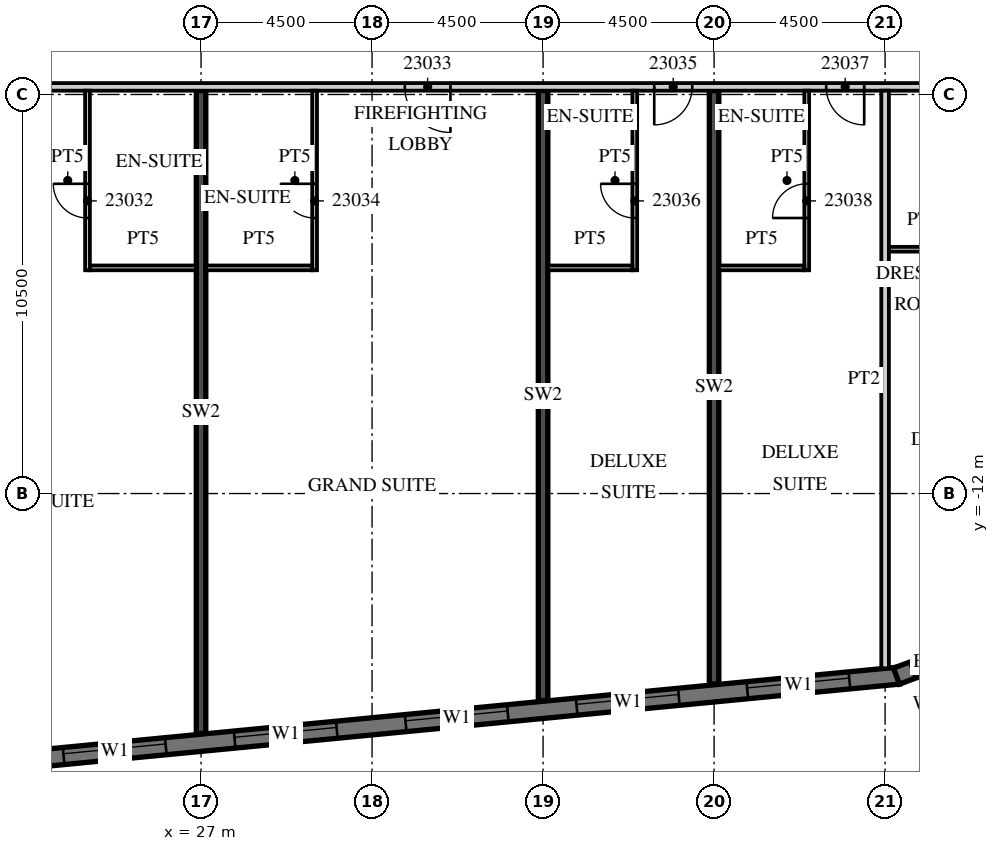
"""IFC4 building model, lengths in metres.
Left out: names, types, materials, properties, quantities, classifications, styles, units other than length and angle.
Written with IfcOpenShell. Run it as: python <this file> out.ifc"""

import sys

from ifc_helpers import new_model, si_unit, direction, frame, frame_2d, origin, place, context, subcontext, project, spatial, polyline, rectangle, outline, extrude, element, fill, save


model = new_model("IFC4")
c1 = context("Model", 3, precision=1e-05, world=origin(), true_north=direction((0.0, 1.0)))
c2 = subcontext(c1, "Body", "Model", "MODEL_VIEW")
j1 = project(units=[si_unit("LENGTHUNIT", "METRE"), si_unit("PLANEANGLEUNIT", "RADIAN")], contexts=[c1])
p1 = place(None, origin())
s1 = spatial("IfcSite", under=j1, at=p1, CompositionType="ELEMENT")
p2 = place(p1, origin())
s2 = spatial("IfcBuilding", under=s1, at=p2, CompositionType="ELEMENT")
p3 = place(p2, frame((0.0, 0.0, 110.8)))
s3 = spatial("IfcBuildingStorey", under=s2, at=p3, CompositionType="ELEMENT", Elevation=110.8)
p4 = place(p3, frame((27.0, -18.311, 0.0), z_axis=(0.0, 0.0, 1.0), x_axis=(0.0, 1.0, 0.0)))
e1 = element("IfcWall", 1, at=p4, inside=s3, PredefinedType="SHEAR", context=c2, shape_type="SweptSolid", body=[
    extrude(rectangle(XDim=16.911, YDim=0.25, at=frame_2d((8.455, 0.0))), origin(), (0.0, 0.0, 1.0), 3.3),
])
p5 = place(p3, frame((36.0, -17.444, 0.0), z_axis=(0.0, 0.0, 1.0), x_axis=(0.0, 1.0, 0.0)))
e2 = element("IfcWall", 2, at=p5, inside=s3, PredefinedType="SHEAR", context=c2, shape_type="SweptSolid", body=[
    extrude(rectangle(XDim=16.044, YDim=0.25, at=frame_2d((8.022, 0.0))), origin(), (0.0, 0.0, 1.0), 3.3),
])
p6 = place(p3, frame((40.5, -17.011, 0.0), z_axis=(0.0, 0.0, 1.0), x_axis=(0.0, 1.0, 0.0)))
e3 = element("IfcWall", 3, at=p6, inside=s3, PredefinedType="SHEAR", context=c2, shape_type="SweptSolid", body=[
    extrude(rectangle(XDim=15.611, YDim=0.25, at=frame_2d((7.805, 0.0))), origin(), (0.0, 0.0, 1.0), 3.3),
])
p7 = place(p3, frame((-13.521, -22.46, 0.0), z_axis=(0.0, 0.0, 1.0), x_axis=(0.995396096335, 0.095846812164, 0.0)))
e4 = element("IfcWall", 4, at=p7, inside=s3, PredefinedType="SOLIDWALL", context=c2, shape_type="SweptSolid", body=[
    extrude(rectangle(XDim=59.151, YDim=0.45, at=frame_2d((29.575, 0.0))), origin(), (0.0, 0.0, 1.0), 3.02),
])
p8 = place(p7, frame((0.91, 0.0, 0.45)))
e5 = element("IfcOpeningElement", 5, at=p8, cuts=e4, PredefinedType="OPENING", context=c2, shape_type="SweptSolid", body=[
    extrude(rectangle(XDim=2.7, YDim=2.25, at=frame_2d((1.35, 1.125))), frame((0.0, 0.235, 0.0), z_axis=(0.0, -1.0, 0.0), x_axis=(1.0, 0.0, 0.0)), (0.0, 0.0, 1.0), 0.47),
])
p9 = place(p7, frame((5.431, 0.0, 0.45)))
e6 = element("IfcOpeningElement", 6, at=p9, cuts=e4, PredefinedType="OPENING", context=c2, shape_type="SweptSolid", body=[
    extrude(rectangle(XDim=2.7, YDim=2.25, at=frame_2d((1.35, 1.125))), frame((0.0, 0.235, 0.0), z_axis=(0.0, -1.0, 0.0), x_axis=(1.0, 0.0, 0.0)), (0.0, 0.0, 1.0), 0.47),
])
p10 = place(p7, frame((9.952, 0.0, 0.45)))
e7 = element("IfcOpeningElement", 7, at=p10, cuts=e4, PredefinedType="OPENING", context=c2, shape_type="SweptSolid", body=[
    extrude(rectangle(XDim=2.7, YDim=2.25, at=frame_2d((1.35, 1.125))), frame((0.0, 0.235, 0.0), z_axis=(0.0, -1.0, 0.0), x_axis=(1.0, 0.0, 0.0)), (0.0, 0.0, 1.0), 0.47),
])
p11 = place(p7, frame((14.473, 0.0, 0.45)))
e8 = element("IfcOpeningElement", 8, at=p11, cuts=e4, PredefinedType="OPENING", context=c2, shape_type="SweptSolid", body=[
    extrude(rectangle(XDim=2.7, YDim=2.25, at=frame_2d((1.35, 1.125))), frame((0.0, 0.235, 0.0), z_axis=(0.0, -1.0, 0.0), x_axis=(1.0, 0.0, 0.0)), (0.0, 0.0, 1.0), 0.47),
])
p12 = place(p7, frame((18.994, 0.0, 0.45)))
e9 = element("IfcOpeningElement", 9, at=p12, cuts=e4, PredefinedType="OPENING", context=c2, shape_type="SweptSolid", body=[
    extrude(rectangle(XDim=2.7, YDim=2.25, at=frame_2d((1.35, 1.125))), frame((0.0, 0.235, 0.0), z_axis=(0.0, -1.0, 0.0), x_axis=(1.0, 0.0, 0.0)), (0.0, 0.0, 1.0), 0.47),
])
p13 = place(p7, frame((23.514, 0.0, 0.45)))
e10 = element("IfcOpeningElement", 10, at=p13, cuts=e4, PredefinedType="OPENING", context=c2, shape_type="SweptSolid", body=[
    extrude(rectangle(XDim=2.7, YDim=2.25, at=frame_2d((1.35, 1.125))), frame((0.0, 0.235, 0.0), z_axis=(0.0, -1.0, 0.0), x_axis=(1.0, 0.0, 0.0)), (0.0, 0.0, 1.0), 0.47),
])
p14 = place(p7, frame((28.035, 0.0, 0.45)))
e11 = element("IfcOpeningElement", 11, at=p14, cuts=e4, PredefinedType="OPENING", context=c2, shape_type="SweptSolid", body=[
    extrude(rectangle(XDim=2.7, YDim=2.25, at=frame_2d((1.35, 1.125))), frame((0.0, 0.235, 0.0), z_axis=(0.0, -1.0, 0.0), x_axis=(1.0, 0.0, 0.0)), (0.0, 0.0, 1.0), 0.47),
])
p15 = place(p7, frame((32.556, 0.0, 0.45)))
e12 = element("IfcOpeningElement", 12, at=p15, cuts=e4, PredefinedType="OPENING", context=c2, shape_type="SweptSolid", body=[
    extrude(rectangle(XDim=2.7, YDim=2.25, at=frame_2d((1.35, 1.125))), frame((0.0, 0.235, 0.0), z_axis=(0.0, -1.0, 0.0), x_axis=(1.0, 0.0, 0.0)), (0.0, 0.0, 1.0), 0.47),
])
p16 = place(p7, frame((37.077, 0.0, 0.45)))
e13 = element("IfcOpeningElement", 13, at=p16, cuts=e4, PredefinedType="OPENING", context=c2, shape_type="SweptSolid", body=[
    extrude(rectangle(XDim=2.7, YDim=2.25, at=frame_2d((1.35, 1.125))), frame((0.0, 0.235, 0.0), z_axis=(0.0, -1.0, 0.0), x_axis=(1.0, 0.0, 0.0)), (0.0, 0.0, 1.0), 0.47),
])
p17 = place(p7, frame((41.598, 0.0, 0.45)))
e14 = element("IfcOpeningElement", 14, at=p17, cuts=e4, PredefinedType="OPENING", context=c2, shape_type="SweptSolid", body=[
    extrude(rectangle(XDim=2.7, YDim=2.25, at=frame_2d((1.35, 1.125))), frame((0.0, 0.235, 0.0), z_axis=(0.0, -1.0, 0.0), x_axis=(1.0, 0.0, 0.0)), (0.0, 0.0, 1.0), 0.47),
])
p18 = place(p7, frame((46.118, 0.0, 0.45)))
e15 = element("IfcOpeningElement", 15, at=p18, cuts=e4, PredefinedType="OPENING", context=c2, shape_type="SweptSolid", body=[
    extrude(rectangle(XDim=2.7, YDim=2.25, at=frame_2d((1.35, 1.125))), frame((0.0, 0.235, 0.0), z_axis=(0.0, -1.0, 0.0), x_axis=(1.0, 0.0, 0.0)), (0.0, 0.0, 1.0), 0.47),
])
p19 = place(p7, frame((50.639, 0.0, 0.45)))
e16 = element("IfcOpeningElement", 16, at=p19, cuts=e4, PredefinedType="OPENING", context=c2, shape_type="SweptSolid", body=[
    extrude(rectangle(XDim=2.7, YDim=2.25, at=frame_2d((1.35, 1.125))), frame((0.0, 0.235, 0.0), z_axis=(0.0, -1.0, 0.0), x_axis=(1.0, 0.0, 0.0)), (0.0, 0.0, 1.0), 0.47),
])
p20 = place(p7, frame((55.15, 0.0, 0.45)))
e17 = element("IfcOpeningElement", 17, at=p20, cuts=e4, PredefinedType="OPENING", context=c2, shape_type="SweptSolid", body=[
    extrude(rectangle(XDim=2.7, YDim=2.25, at=frame_2d((1.35, 1.125))), frame((0.0, 0.235, 0.0), z_axis=(0.0, -1.0, 0.0), x_axis=(1.0, 0.0, 0.0)), (0.0, 0.0, 1.0), 0.47),
])
p21 = place(p3, frame((45.3, -16.804, 0.0), z_axis=(0.0, 0.0, 1.0), x_axis=(0.936677599948, 0.350192909346, 0.0)))
e18 = element("IfcWall", 18, at=p21, inside=s3, PredefinedType="SOLIDWALL", context=c2, shape_type="SweptSolid", body=[
    extrude(outline(polyline([(0.0, -0.225), (2.071, -0.225), (1.95, 0.225), (0.121, 0.225), (0.0, -0.225)])), origin(), (0.0, 0.0, 1.0), 3.02),
])
p22 = place(p21, frame((0.435, 0.0, 0.45)))
e19 = element("IfcOpeningElement", 19, at=p22, cuts=e18, PredefinedType="OPENING", context=c2, shape_type="SweptSolid", body=[
    extrude(rectangle(XDim=1.2, YDim=2.25, at=frame_2d((0.6, 1.125))), frame((0.0, 0.235, 0.0), z_axis=(0.0, -1.0, 0.0), x_axis=(1.0, 0.0, 0.0)), (0.0, 0.0, 1.0), 0.47),
])
p23 = place(p3, frame((48.753, -12.672, 0.0), z_axis=(0.0, 0.0, 1.0), x_axis=(-0.095842661909, 0.995396495954, 0.0)))
e20 = element("IfcWall", 20, at=p23, inside=s3, PredefinedType="SOLIDWALL", context=c2, shape_type="SweptSolid", body=[
    extrude(rectangle(XDim=35.0, YDim=0.45, at=frame_2d((17.5, 0.0))), origin(), (0.0, 0.0, 1.0), 3.02),
])
p24 = place(p23, frame((3.072, 0.0, 0.45)))
e21 = element("IfcOpeningElement", 21, at=p24, cuts=e20, PredefinedType="OPENING", context=c2, shape_type="SweptSolid", body=[
    extrude(rectangle(XDim=3.3, YDim=2.25, at=frame_2d((1.65, 1.125))), frame((0.0, 0.235, 0.0), z_axis=(0.0, -1.0, 0.0), x_axis=(1.0, 0.0, 0.0)), (0.0, 0.0, 1.0), 0.47),
])
p25 = place(p23, frame((7.593, 0.0, 0.45)))
e22 = element("IfcOpeningElement", 22, at=p25, cuts=e20, PredefinedType="OPENING", context=c2, shape_type="SweptSolid", body=[
    extrude(rectangle(XDim=3.3, YDim=2.25, at=frame_2d((1.65, 1.125))), frame((0.0, 0.235, 0.0), z_axis=(0.0, -1.0, 0.0), x_axis=(1.0, 0.0, 0.0)), (0.0, 0.0, 1.0), 0.47),
])
p26 = place(p3, frame((-13.5, -1.3, 0.0), z_axis=(0.0, 0.0, 1.0), x_axis=(1.0, 0.0, 0.0)))
e23 = element("IfcWall", 23, at=p26, inside=s3, PredefinedType="PARTITIONING", context=c2, shape_type="SweptSolid", body=[
    extrude(rectangle(XDim=60.932, YDim=0.2, at=frame_2d((30.466, 0.0))), origin(), (0.0, 0.0, 1.0), 3.02),
])
p27 = place(p26, frame((0.575, 0.0, 0.0)))
e24 = element("IfcOpeningElement", 24, at=p27, cuts=e23, PredefinedType="OPENING", context=c2, shape_type="SweptSolid", body=[
    extrude(rectangle(XDim=1.0, YDim=2.1, at=frame_2d((0.5, 1.05))), frame((0.0, 0.11, 0.0), z_axis=(0.0, -1.0, 0.0), x_axis=(1.0, 0.0, 0.0)), (0.0, 0.0, 1.0), 0.22),
])
p28 = place(p26, frame((5.075, 0.0, 0.0)))
e25 = element("IfcOpeningElement", 25, at=p28, cuts=e23, PredefinedType="OPENING", context=c2, shape_type="SweptSolid", body=[
    extrude(rectangle(XDim=1.0, YDim=2.1, at=frame_2d((0.5, 1.05))), frame((0.0, 0.11, 0.0), z_axis=(0.0, -1.0, 0.0), x_axis=(1.0, 0.0, 0.0)), (0.0, 0.0, 1.0), 0.22),
])
p29 = place(p26, frame((11.925, 0.0, 0.0)))
e26 = element("IfcOpeningElement", 26, at=p29, cuts=e23, PredefinedType="OPENING", context=c2, shape_type="SweptSolid", body=[
    extrude(rectangle(XDim=1.0, YDim=2.1, at=frame_2d((0.5, 1.05))), frame((0.0, 0.11, 0.0), z_axis=(0.0, -1.0, 0.0), x_axis=(1.0, 0.0, 0.0)), (0.0, 0.0, 1.0), 0.22),
])
p30 = place(p26, frame((15.938, 0.0, 0.0)))
e27 = element("IfcOpeningElement", 27, at=p30, cuts=e23, PredefinedType="OPENING", context=c2, shape_type="SweptSolid", body=[
    extrude(rectangle(XDim=1.2, YDim=2.1, at=frame_2d((0.6, 1.05))), frame((0.0, 0.11, 0.0), z_axis=(0.0, -1.0, 0.0), x_axis=(1.0, 0.0, 0.0)), (0.0, 0.0, 1.0), 0.22),
])
p31 = place(p26, frame((25.45, 0.0, 0.0)))
e28 = element("IfcOpeningElement", 28, at=p31, cuts=e23, PredefinedType="OPENING", context=c2, shape_type="SweptSolid", body=[
    extrude(rectangle(XDim=1.0, YDim=2.1, at=frame_2d((0.5, 1.05))), frame((0.0, 0.11, 0.0), z_axis=(0.0, -1.0, 0.0), x_axis=(1.0, 0.0, 0.0)), (0.0, 0.0, 1.0), 0.22),
])
p32 = place(p26, frame((27.55, 0.0, 0.0)))
e29 = element("IfcOpeningElement", 29, at=p32, cuts=e23, PredefinedType="OPENING", context=c2, shape_type="SweptSolid", body=[
    extrude(rectangle(XDim=1.0, YDim=2.1, at=frame_2d((0.5, 1.05))), frame((0.0, 0.11, 0.0), z_axis=(0.0, -1.0, 0.0), x_axis=(1.0, 0.0, 0.0)), (0.0, 0.0, 1.0), 0.22),
])
p33 = place(p26, frame((33.938, 0.0, 0.0)))
e30 = element("IfcOpeningElement", 30, at=p33, cuts=e23, PredefinedType="OPENING", context=c2, shape_type="SweptSolid", body=[
    extrude(rectangle(XDim=1.2, YDim=2.1, at=frame_2d((0.6, 1.05))), frame((0.0, 0.11, 0.0), z_axis=(0.0, -1.0, 0.0), x_axis=(1.0, 0.0, 0.0)), (0.0, 0.0, 1.0), 0.22),
])
p34 = place(p26, frame((45.862, 0.0, 0.0)))
e31 = element("IfcOpeningElement", 31, at=p34, cuts=e23, PredefinedType="OPENING", context=c2, shape_type="SweptSolid", body=[
    extrude(rectangle(XDim=1.2, YDim=2.1, at=frame_2d((0.6, 1.05))), frame((0.0, 0.11, 0.0), z_axis=(0.0, -1.0, 0.0), x_axis=(1.0, 0.0, 0.0)), (0.0, 0.0, 1.0), 0.22),
])
p35 = place(p26, frame((52.425, 0.0, 0.0)))
e32 = element("IfcOpeningElement", 32, at=p35, cuts=e23, PredefinedType="OPENING", context=c2, shape_type="SweptSolid", body=[
    extrude(rectangle(XDim=1.0, YDim=2.1, at=frame_2d((0.5, 1.05))), frame((0.0, 0.11, 0.0), z_axis=(0.0, -1.0, 0.0), x_axis=(1.0, 0.0, 0.0)), (0.0, 0.0, 1.0), 0.22),
])
p36 = place(p26, frame((56.95, 0.0, 0.0)))
e33 = element("IfcOpeningElement", 33, at=p36, cuts=e23, PredefinedType="OPENING", context=c2, shape_type="SweptSolid", body=[
    extrude(rectangle(XDim=1.0, YDim=2.1, at=frame_2d((0.5, 1.05))), frame((0.0, 0.11, 0.0), z_axis=(0.0, -1.0, 0.0), x_axis=(1.0, 0.0, 0.0)), (0.0, 0.0, 1.0), 0.22),
])
p37 = place(p26, frame((59.882, 0.0, 0.0)))
e34 = element("IfcOpeningElement", 34, at=p37, cuts=e23, PredefinedType="OPENING", context=c2, shape_type="SweptSolid", body=[
    extrude(rectangle(XDim=0.9, YDim=2.1, at=frame_2d((0.45, 1.05))), frame((0.0, 0.11, 0.0), z_axis=(0.0, -1.0, 0.0), x_axis=(1.0, 0.0, 0.0)), (0.0, 0.0, 1.0), 0.22),
])
p38 = place(p3, frame((24.012, -6.125, 0.0), z_axis=(0.0, 0.0, 1.0), x_axis=(0.0, 1.0, 0.0)))
e35 = element("IfcWall", 35, at=p38, inside=s3, PredefinedType="PARTITIONING", context=c2, shape_type="SweptSolid", body=[
    extrude(rectangle(XDim=4.725, YDim=0.125, at=frame_2d((2.363, 0.0))), origin(), (0.0, 0.0, 1.0), 3.02),
])
p39 = place(p38, frame((1.375, 0.0, 0.0)))
e36 = element("IfcOpeningElement", 36, at=p39, cuts=e35, PredefinedType="OPENING", context=c2, shape_type="SweptSolid", body=[
    extrude(rectangle(XDim=0.9, YDim=2.1, at=frame_2d((0.45, 1.05))), frame((0.0, 0.073, 0.0), z_axis=(0.0, -1.0, 0.0), x_axis=(1.0, 0.0, 0.0)), (0.0, 0.0, 1.0), 0.145),
])
p40 = place(p3, frame((24.075, -6.062, 0.0), z_axis=(0.0, 0.0, 1.0), x_axis=(1.0, 0.0, 0.0)))
e37 = element("IfcWall", 37, at=p40, inside=s3, PredefinedType="PARTITIONING", context=c2, shape_type="SweptSolid", body=[
    extrude(rectangle(XDim=2.8, YDim=0.125, at=frame_2d((1.4, 0.0))), origin(), (0.0, 0.0, 1.0), 3.02),
])
p41 = place(p3, frame((29.988, -6.125, 0.0), z_axis=(0.0, 0.0, 1.0), x_axis=(0.0, 1.0, 0.0)))
e38 = element("IfcWall", 38, at=p41, inside=s3, PredefinedType="PARTITIONING", context=c2, shape_type="SweptSolid", body=[
    extrude(rectangle(XDim=4.725, YDim=0.125, at=frame_2d((2.363, 0.0))), origin(), (0.0, 0.0, 1.0), 3.02),
])
p42 = place(p41, frame((1.375, 0.0, 0.0)))
e39 = element("IfcOpeningElement", 39, at=p42, cuts=e38, PredefinedType="OPENING", context=c2, shape_type="SweptSolid", body=[
    extrude(rectangle(XDim=0.9, YDim=2.1, at=frame_2d((0.45, 1.05))), frame((0.0, 0.073, 0.0), z_axis=(0.0, -1.0, 0.0), x_axis=(1.0, 0.0, 0.0)), (0.0, 0.0, 1.0), 0.145),
])
p43 = place(p3, frame((27.125, -6.062, 0.0), z_axis=(0.0, 0.0, 1.0), x_axis=(1.0, 0.0, 0.0)))
e40 = element("IfcWall", 40, at=p43, inside=s3, PredefinedType="PARTITIONING", context=c2, shape_type="SweptSolid", body=[
    extrude(rectangle(XDim=2.8, YDim=0.125, at=frame_2d((1.4, 0.0))), origin(), (0.0, 0.0, 1.0), 3.02),
])
p44 = place(p3, frame((38.413, -6.125, 0.0), z_axis=(0.0, 0.0, 1.0), x_axis=(0.0, 1.0, 0.0)))
e41 = element("IfcWall", 41, at=p44, inside=s3, PredefinedType="PARTITIONING", context=c2, shape_type="SweptSolid", body=[
    extrude(rectangle(XDim=4.725, YDim=0.125, at=frame_2d((2.363, 0.0))), origin(), (0.0, 0.0, 1.0), 3.02),
])
p45 = place(p44, frame((1.375, 0.0, 0.0)))
e42 = element("IfcOpeningElement", 42, at=p45, cuts=e41, PredefinedType="OPENING", context=c2, shape_type="SweptSolid", body=[
    extrude(rectangle(XDim=0.9, YDim=2.1, at=frame_2d((0.45, 1.05))), frame((0.0, 0.073, 0.0), z_axis=(0.0, -1.0, 0.0), x_axis=(1.0, 0.0, 0.0)), (0.0, 0.0, 1.0), 0.145),
])
p46 = place(p3, frame((36.125, -6.062, 0.0), z_axis=(0.0, 0.0, 1.0), x_axis=(1.0, 0.0, 0.0)))
e43 = element("IfcWall", 43, at=p46, inside=s3, PredefinedType="PARTITIONING", context=c2, shape_type="SweptSolid", body=[
    extrude(rectangle(XDim=2.225, YDim=0.125, at=frame_2d((1.113, 0.0))), origin(), (0.0, 0.0, 1.0), 3.02),
])
p47 = place(p3, frame((45.0, -16.599, 0.0), z_axis=(0.0, 0.0, 1.0), x_axis=(0.0, 1.0, 0.0)))
e44 = element("IfcWall", 44, at=p47, inside=s3, PredefinedType="PARTITIONING", context=c2, shape_type="SweptSolid", body=[
    extrude(rectangle(XDim=15.199, YDim=0.2, at=frame_2d((7.6, 0.0))), origin(), (0.0, 0.0, 1.0), 3.02),
])
p48 = place(p3, frame((42.938, -6.125, 0.0), z_axis=(0.0, 0.0, 1.0), x_axis=(0.0, 1.0, 0.0)))
e45 = element("IfcWall", 45, at=p48, inside=s3, PredefinedType="PARTITIONING", context=c2, shape_type="SweptSolid", body=[
    extrude(rectangle(XDim=4.725, YDim=0.125, at=frame_2d((2.363, 0.0))), origin(), (0.0, 0.0, 1.0), 3.02),
])
p49 = place(p48, frame((1.375, 0.0, 0.0)))
e46 = element("IfcOpeningElement", 46, at=p49, cuts=e45, PredefinedType="OPENING", context=c2, shape_type="SweptSolid", body=[
    extrude(rectangle(XDim=0.9, YDim=2.1, at=frame_2d((0.45, 1.05))), frame((0.0, 0.073, 0.0), z_axis=(0.0, -1.0, 0.0), x_axis=(1.0, 0.0, 0.0)), (0.0, 0.0, 1.0), 0.145),
])
p50 = place(p3, frame((40.625, -6.062, 0.0), z_axis=(0.0, 0.0, 1.0), x_axis=(1.0, 0.0, 0.0)))
e47 = element("IfcWall", 47, at=p50, inside=s3, PredefinedType="PARTITIONING", context=c2, shape_type="SweptSolid", body=[
    extrude(rectangle(XDim=2.25, YDim=0.125, at=frame_2d((1.125, 0.0))), origin(), (0.0, 0.0, 1.0), 3.02),
])
p51 = place(p3, frame((45.1, -5.572, 0.0), z_axis=(0.0, 0.0, 1.0), x_axis=(1.0, 0.0, 0.0)))
e48 = element("IfcWall", 48, at=p51, inside=s3, PredefinedType="PARTITIONING", context=c2, shape_type="SweptSolid", body=[
    extrude(rectangle(XDim=1.8, YDim=0.125, at=frame_2d((0.9, 0.0))), origin(), (0.0, 0.0, 1.0), 3.02),
])
p52 = place(p16, origin())
e49 = element("IfcWindow", 49, at=p52, inside=s3, PartitioningType="SINGLE_PANEL", PredefinedType="WINDOW", context=c2, shape_type="SweptSolid", body=[
    extrude(rectangle(XDim=2.7, YDim=2.25, at=frame_2d((1.35, 1.125))), frame((0.0, 0.09, 0.0), z_axis=(0.0, -1.0, 0.0), x_axis=(1.0, 0.0, 0.0)), (0.0, 0.0, 1.0), 0.06),
])
fill(e13, e49)
p53 = place(p17, origin())
e50 = element("IfcWindow", 50, at=p53, inside=s3, PartitioningType="SINGLE_PANEL", PredefinedType="WINDOW", context=c2, shape_type="SweptSolid", body=[
    extrude(rectangle(XDim=2.7, YDim=2.25, at=frame_2d((1.35, 1.125))), frame((0.0, 0.09, 0.0), z_axis=(0.0, -1.0, 0.0), x_axis=(1.0, 0.0, 0.0)), (0.0, 0.0, 1.0), 0.06),
])
fill(e14, e50)
p54 = place(p18, origin())
e51 = element("IfcWindow", 51, at=p54, inside=s3, PartitioningType="SINGLE_PANEL", PredefinedType="WINDOW", context=c2, shape_type="SweptSolid", body=[
    extrude(rectangle(XDim=2.7, YDim=2.25, at=frame_2d((1.35, 1.125))), frame((0.0, 0.09, 0.0), z_axis=(0.0, -1.0, 0.0), x_axis=(1.0, 0.0, 0.0)), (0.0, 0.0, 1.0), 0.06),
])
fill(e15, e51)
p55 = place(p19, origin())
e52 = element("IfcWindow", 52, at=p55, inside=s3, PartitioningType="SINGLE_PANEL", PredefinedType="WINDOW", context=c2, shape_type="SweptSolid", body=[
    extrude(rectangle(XDim=2.7, YDim=2.25, at=frame_2d((1.35, 1.125))), frame((0.0, 0.09, 0.0), z_axis=(0.0, -1.0, 0.0), x_axis=(1.0, 0.0, 0.0)), (0.0, 0.0, 1.0), 0.06),
])
fill(e16, e52)
p56 = place(p20, origin())
e53 = element("IfcWindow", 53, at=p56, inside=s3, PartitioningType="SINGLE_PANEL", PredefinedType="WINDOW", context=c2, shape_type="SweptSolid", body=[
    extrude(rectangle(XDim=2.7, YDim=2.25, at=frame_2d((1.35, 1.125))), frame((0.0, 0.09, 0.0), z_axis=(0.0, -1.0, 0.0), x_axis=(1.0, 0.0, 0.0)), (0.0, 0.0, 1.0), 0.06),
])
fill(e17, e53)
p57 = place(p22, origin())
e54 = element("IfcWindow", 54, at=p57, inside=s3, PartitioningType="SINGLE_PANEL", PredefinedType="WINDOW", context=c2, shape_type="SweptSolid", body=[
    extrude(rectangle(XDim=1.2, YDim=2.25, at=frame_2d((0.6, 1.125))), frame((0.0, 0.09, 0.0), z_axis=(0.0, -1.0, 0.0), x_axis=(1.0, 0.0, 0.0)), (0.0, 0.0, 1.0), 0.06),
])
fill(e19, e54)
p58 = place(p39, origin())
e55 = element("IfcDoor", 55, at=p58, inside=s3, OperationType="SINGLE_SWING_RIGHT", PredefinedType="DOOR", context=c2, shape_type="SweptSolid", body=[
    extrude(rectangle(XDim=0.9, YDim=2.1, at=frame_2d((0.45, 1.05))), frame((0.0, 0.025, 0.0), z_axis=(0.0, -1.0, 0.0), x_axis=(1.0, 0.0, 0.0)), (0.0, 0.0, 1.0), 0.05),
])
fill(e36, e55)
p59 = place(p34, origin())
e56 = element("IfcDoor", 56, at=p59, inside=s3, OperationType="SINGLE_SWING_RIGHT", PredefinedType="DOOR", context=c2, shape_type="SweptSolid", body=[
    extrude(rectangle(XDim=1.2, YDim=2.1, at=frame_2d((0.6, 1.05))), frame((0.0, 0.025, 0.0), z_axis=(0.0, -1.0, 0.0), x_axis=(1.0, 0.0, 0.0)), (0.0, 0.0, 1.0), 0.05),
])
fill(e31, e56)
p60 = place(p42, origin())
e57 = element("IfcDoor", 57, at=p60, inside=s3, OperationType="SINGLE_SWING_RIGHT", PredefinedType="DOOR", context=c2, shape_type="SweptSolid", body=[
    extrude(rectangle(XDim=0.9, YDim=2.1, at=frame_2d((0.45, 1.05))), frame((0.0, 0.025, 0.0), z_axis=(0.0, -1.0, 0.0), x_axis=(1.0, 0.0, 0.0)), (0.0, 0.0, 1.0), 0.05),
])
fill(e39, e57)
p61 = place(p35, origin())
e58 = element("IfcDoor", 58, at=p61, inside=s3, OperationType="SINGLE_SWING_LEFT", PredefinedType="DOOR", context=c2, shape_type="SweptSolid", body=[
    extrude(rectangle(XDim=1.0, YDim=2.1, at=frame_2d((0.5, 1.05))), frame((0.0, 0.025, 0.0), z_axis=(0.0, -1.0, 0.0), x_axis=(1.0, 0.0, 0.0)), (0.0, 0.0, 1.0), 0.05),
])
fill(e32, e58)
p62 = place(p45, origin())
e59 = element("IfcDoor", 59, at=p62, inside=s3, OperationType="SINGLE_SWING_RIGHT", PredefinedType="DOOR", context=c2, shape_type="SweptSolid", body=[
    extrude(rectangle(XDim=0.9, YDim=2.1, at=frame_2d((0.45, 1.05))), frame((0.0, 0.025, 0.0), z_axis=(0.0, -1.0, 0.0), x_axis=(1.0, 0.0, 0.0)), (0.0, 0.0, 1.0), 0.05),
])
fill(e42, e59)
p63 = place(p36, origin())
e60 = element("IfcDoor", 60, at=p63, inside=s3, OperationType="SINGLE_SWING_RIGHT", PredefinedType="DOOR", context=c2, shape_type="SweptSolid", body=[
    extrude(rectangle(XDim=1.0, YDim=2.1, at=frame_2d((0.5, 1.05))), frame((0.0, 0.025, 0.0), z_axis=(0.0, -1.0, 0.0), x_axis=(1.0, 0.0, 0.0)), (0.0, 0.0, 1.0), 0.05),
])
fill(e33, e60)
p64 = place(p49, origin())
e61 = element("IfcDoor", 61, at=p64, inside=s3, OperationType="SINGLE_SWING_LEFT", PredefinedType="DOOR", context=c2, shape_type="SweptSolid", body=[
    extrude(rectangle(XDim=0.9, YDim=2.1, at=frame_2d((0.45, 1.05))), frame((0.0, 0.025, 0.0), z_axis=(0.0, -1.0, 0.0), x_axis=(1.0, 0.0, 0.0)), (0.0, 0.0, 1.0), 0.05),
])
fill(e46, e61)
save(model, sys.argv[1])
